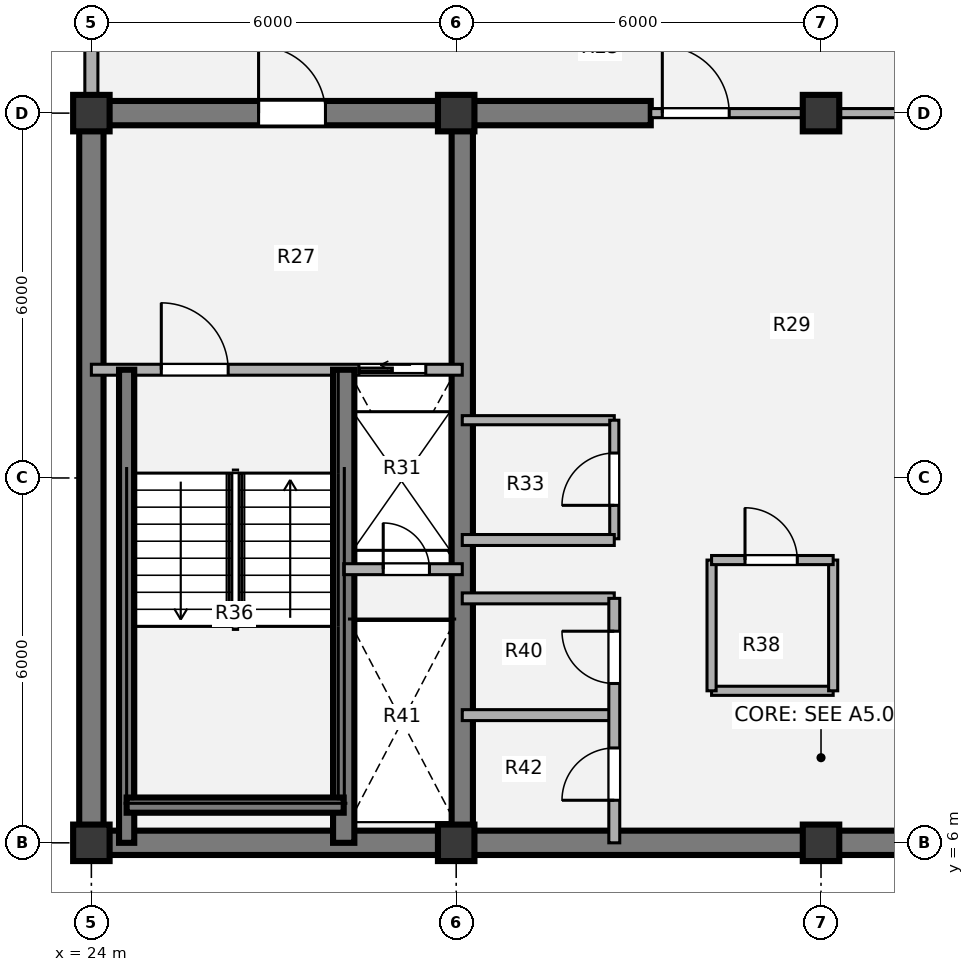
"""IFC4 building model, lengths in metres.
Left out: names, types, materials, properties, quantities, classifications, styles, units other than length and angle.
Written with IfcOpenShell. Run it as: python <this file> out.ifc"""

import sys

from ifc_helpers import new_model, si_unit, direction, frame, frame_2d, origin, origin_2d, place, context, subcontext, project, spatial, rectangle, extrude, source, transform, mapped, element, fill, save


model = new_model("IFC4")
c1 = context("Model", 3, precision=1e-05, world=origin(), true_north=direction((0.0, 1.0)))
c2 = subcontext(c1, "Body", "Model", "MODEL_VIEW")
j1 = project(units=[si_unit("LENGTHUNIT", "METRE"), si_unit("PLANEANGLEUNIT", "RADIAN")], contexts=[c1])
p1 = place(None, origin())
s1 = spatial("IfcSite", under=j1, at=p1, CompositionType="ELEMENT")
p2 = place(p1, origin())
s2 = spatial("IfcBuilding", under=s1, at=p2, CompositionType="ELEMENT")
p3 = place(p2, frame((0.0, 0.0, 264.6)))
s3 = spatial("IfcBuildingStorey", under=s2, at=p3, CompositionType="ELEMENT", Elevation=264.6)
m1 = source(origin(), c2, "Body", "SweptSolid", [
    extrude(rectangle(XDim=0.6, YDim=0.6, at=origin_2d()), origin(), (0.0, 0.0, 1.0), 3.78),
])
for number, where, z_axis, x_axis in (
    (1, (24.0, 6.0, 0.0), (0.0, 0.0, 1.0), (1.0, 0.0, 0.0)),
    (2, (30.0, 6.0, 0.0), (0.0, 0.0, 1.0), (1.0, 0.0, 0.0)),
    (3, (36.0, 6.0, 0.0), (0.0, 0.0, 1.0), (1.0, 0.0, 0.0)),
    (4, (24.0, 18.0, 0.0), (0.0, 0.0, 1.0), (1.0, 0.0, 0.0)),
    (5, (30.0, 18.0, 0.0), (0.0, 0.0, 1.0), (1.0, 0.0, 0.0)),
    (6, (36.0, 18.0, 0.0), (0.0, 0.0, 1.0), (1.0, 0.0, 0.0)),
):
    element("IfcColumn", number, at=place(p3, frame(where, z_axis=z_axis, x_axis=x_axis)), inside=s3, PredefinedType="COLUMN", context=c2, shape_type="MappedRepresentation", body=[
        mapped(m1, transform((0.0, 0.0, 0.0), x_axis=(1.0, 0.0, 0.0), y_axis=(0.0, 1.0, 0.0), z_axis=(0.0, 0.0, 1.0), scale=1.0)),
    ])
p4 = place(p3, frame((48.2, 6.0, 0.0), z_axis=(0.0, 0.0, 1.0), x_axis=(-1.0, 0.0, 0.0)))
e7 = element("IfcWall", 7, at=p4, inside=s3, PredefinedType="SHEAR", context=c2, shape_type="SweptSolid", body=[
    extrude(rectangle(XDim=24.4, YDim=0.4, at=frame_2d((12.2, 0.0))), origin(), (0.0, 0.0, 1.0), 3.78),
])
p5 = place(p3, frame((24.0, 6.0, 0.0), z_axis=(0.0, 0.0, 1.0), x_axis=(0.0, 1.0, 0.0)))
e8 = element("IfcWall", 8, at=p5, inside=s3, PredefinedType="SHEAR", context=c2, shape_type="SweptSolid", body=[
    extrude(rectangle(XDim=12.0, YDim=0.4, at=frame_2d((6.0, 0.0))), origin(), (0.0, 0.0, 1.0), 3.78),
])
p6 = place(p3, frame((23.8, 18.0, 0.0), z_axis=(0.0, 0.0, 1.0), x_axis=(1.0, 0.0, 0.0)))
e9 = element("IfcWall", 9, at=p6, inside=s3, PredefinedType="SHEAR", context=c2, shape_type="SweptSolid", body=[
    extrude(rectangle(XDim=9.4, YDim=0.4, at=frame_2d((4.7, 0.0))), origin(), (0.0, 0.0, 1.0), 3.78),
])
p7 = place(p6, frame((2.95, 0.0, 0.0)))
e10 = element("IfcOpeningElement", 10, at=p7, cuts=e9, PredefinedType="OPENING", context=c2, shape_type="SweptSolid", body=[
    extrude(rectangle(XDim=1.1, YDim=2.1, at=origin_2d()), frame((0.55, 0.21, 1.05), z_axis=(0.0, -1.0, 0.0), x_axis=(1.0, 0.0, 0.0)), (0.0, 0.0, 1.0), 0.42),
])
p8 = place(p3, frame((30.1, 6.0, 0.0), z_axis=(0.0, 0.0, 1.0), x_axis=(0.0, 1.0, 0.0)))
e11 = element("IfcWall", 11, at=p8, inside=s3, PredefinedType="SHEAR", context=c2, shape_type="SweptSolid", body=[
    extrude(rectangle(XDim=12.0, YDim=0.35, at=frame_2d((6.0, 0.0))), origin(), (0.0, 0.0, 1.0), 3.78),
])
p9 = place(p3, frame((24.0, 18.28, 0.0), z_axis=(0.0, 0.0, 1.0), x_axis=(0.0, 1.0, 0.0)))
e12 = element("IfcWall", 12, at=p9, inside=s3, PredefinedType="SOLIDWALL", context=c2, shape_type="SweptSolid", body=[
    extrude(rectangle(XDim=2.77, YDim=0.215, at=frame_2d((1.385, 0.0))), origin(), (0.0, 0.0, 1.0), 2.718),
])
p10 = place(p3, frame((30.1, 12.95, 0.0), z_axis=(0.0, 0.0, 1.0), x_axis=(1.0, 0.0, 0.0)))
e13 = element("IfcWall", 13, at=p10, inside=s3, PredefinedType="PARTITIONING", context=c2, shape_type="SweptSolid", body=[
    extrude(rectangle(XDim=2.5, YDim=0.15, at=frame_2d((1.25, 0.0))), origin(), (0.0, 0.0, 1.0), 3.5),
])
p11 = place(p3, frame((32.6, 11.0, 0.0), z_axis=(0.0, 0.0, 1.0), x_axis=(0.0, 1.0, 0.0)))
e14 = element("IfcWall", 14, at=p11, inside=s3, PredefinedType="PARTITIONING", context=c2, shape_type="SweptSolid", body=[
    extrude(rectangle(XDim=1.95, YDim=0.15, at=frame_2d((0.975, 0.0))), origin(), (0.0, 0.0, 1.0), 3.5),
])
p12 = place(p11, frame((0.55, 0.0, 0.0)))
e15 = element("IfcOpeningElement", 15, at=p12, cuts=e14, PredefinedType="OPENING", context=c2, shape_type="SweptSolid", body=[
    extrude(rectangle(XDim=0.86, YDim=2.1, at=origin_2d()), frame((0.43, 0.085, 1.05), z_axis=(0.0, -1.0, 0.0), x_axis=(1.0, 0.0, 0.0)), (0.0, 0.0, 1.0), 0.17),
])
p13 = place(p3, frame((34.2, 8.5, 0.0), z_axis=(0.0, 0.0, 1.0), x_axis=(1.0, 0.0, 0.0)))
e16 = element("IfcWall", 16, at=p13, inside=s3, PredefinedType="PARTITIONING", context=c2, shape_type="SweptSolid", body=[
    extrude(rectangle(XDim=2.0, YDim=0.15, at=frame_2d((1.0, 0.0))), origin(), (0.0, 0.0, 1.0), 3.5),
])
p14 = place(p3, frame((34.2, 8.5, 0.0), z_axis=(0.0, 0.0, 1.0), x_axis=(0.0, 1.0, 0.0)))
e17 = element("IfcWall", 17, at=p14, inside=s3, PredefinedType="PARTITIONING", context=c2, shape_type="SweptSolid", body=[
    extrude(rectangle(XDim=2.15, YDim=0.15, at=frame_2d((1.075, 0.0))), origin(), (0.0, 0.0, 1.0), 3.5),
])
p15 = place(p3, frame((36.2, 8.5, 0.0), z_axis=(0.0, 0.0, 1.0), x_axis=(0.0, 1.0, 0.0)))
e18 = element("IfcWall", 18, at=p15, inside=s3, PredefinedType="PARTITIONING", context=c2, shape_type="SweptSolid", body=[
    extrude(rectangle(XDim=2.15, YDim=0.15, at=frame_2d((1.075, 0.0))), origin(), (0.0, 0.0, 1.0), 2.715),
])
p16 = place(p3, frame((34.2, 10.65, 0.0), z_axis=(0.0, 0.0, 1.0), x_axis=(1.0, 0.0, 0.0)))
e19 = element("IfcWall", 19, at=p16, inside=s3, PredefinedType="PARTITIONING", context=c2, shape_type="SweptSolid", body=[
    extrude(rectangle(XDim=2.0, YDim=0.15, at=frame_2d((1.0, 0.0))), origin(), (0.0, 0.0, 1.0), 3.5),
])
p17 = place(p16, frame((0.55, 0.0, 0.0)))
e20 = element("IfcOpeningElement", 20, at=p17, cuts=e19, PredefinedType="OPENING", context=c2, shape_type="SweptSolid", body=[
    extrude(rectangle(XDim=0.86, YDim=2.1, at=origin_2d()), frame((0.43, 0.085, 1.05), z_axis=(0.0, -1.0, 0.0), x_axis=(1.0, 0.0, 0.0)), (0.0, 0.0, 1.0), 0.17),
])
for number, where, z_axis, x_axis in (
    (21, (30.1, 10.98, 0.0), (0.0, 0.0, 1.0), (1.0, 0.0, 0.0)),
    (22, (30.1, 8.1, 0.0), (0.0, 0.0, 1.0), (1.0, 0.0, 0.0)),
    (23, (30.1, 10.02, 0.0), (0.0, 0.0, 1.0), (1.0, 0.0, 0.0)),
):
    element("IfcWall", number, at=place(p3, frame(where, z_axis=z_axis, x_axis=x_axis)), inside=s3, PredefinedType="PARTITIONING", context=c2, shape_type="SweptSolid", body=[
        extrude(rectangle(XDim=2.5, YDim=0.18, at=frame_2d((1.25, 0.0))), origin(), (0.0, 0.0, 1.0), 3.5),
    ])
p18 = place(p3, frame((32.6, 6.0, 0.0), z_axis=(0.0, 0.0, 1.0), x_axis=(0.0, 1.0, 0.0)))
e24 = element("IfcWall", 24, at=p18, inside=s3, PredefinedType="PARTITIONING", context=c2, shape_type="SweptSolid", body=[
    extrude(rectangle(XDim=4.02, YDim=0.18, at=frame_2d((2.01, 0.0))), origin(), (0.0, 0.0, 1.0), 3.5),
])
p19 = place(p18, frame((0.7, 0.0, 0.0)))
e25 = element("IfcOpeningElement", 25, at=p19, cuts=e24, PredefinedType="OPENING", context=c2, shape_type="SweptSolid", body=[
    extrude(rectangle(XDim=0.86, YDim=2.1, at=origin_2d()), frame((0.43, 0.1, 1.05), z_axis=(0.0, -1.0, 0.0), x_axis=(1.0, 0.0, 0.0)), (0.0, 0.0, 1.0), 0.2),
])
p20 = place(p18, frame((2.62, 0.0, 0.0)))
e26 = element("IfcOpeningElement", 26, at=p20, cuts=e24, PredefinedType="OPENING", context=c2, shape_type="SweptSolid", body=[
    extrude(rectangle(XDim=0.86, YDim=2.1, at=origin_2d()), frame((0.43, 0.1, 1.05), z_axis=(0.0, -1.0, 0.0), x_axis=(1.0, 0.0, 0.0)), (0.0, 0.0, 1.0), 0.2),
])
p21 = place(p3, frame((33.2, 18.0, 0.0), z_axis=(0.0, 0.0, 1.0), x_axis=(1.0, 0.0, 0.0)))
e27 = element("IfcWall", 27, at=p21, inside=s3, PredefinedType="PARTITIONING", context=c2, shape_type="SweptSolid", body=[
    extrude(rectangle(XDim=5.6, YDim=0.15, at=frame_2d((2.8, 0.0))), origin(), (0.0, 0.0, 1.0), 2.515),
])
p22 = place(p21, frame((0.19, 0.0, 0.0)))
e28 = element("IfcOpeningElement", 28, at=p22, cuts=e27, PredefinedType="OPENING", context=c2, shape_type="SweptSolid", body=[
    extrude(rectangle(XDim=1.1, YDim=2.1, at=origin_2d()), frame((0.55, 0.085, 1.05), z_axis=(0.0, -1.0, 0.0), x_axis=(1.0, 0.0, 0.0)), (0.0, 0.0, 1.0), 0.17),
])
p23 = place(p21, frame((4.31, 0.0, 0.0)))
e29 = element("IfcOpeningElement", 29, at=p23, cuts=e27, PredefinedType="OPENING", context=c2, shape_type="SweptSolid", body=[
    extrude(rectangle(XDim=1.1, YDim=2.1, at=origin_2d()), frame((0.55, 0.085, 1.05), z_axis=(0.0, -1.0, 0.0), x_axis=(1.0, 0.0, 0.0)), (0.0, 0.0, 1.0), 0.17),
])
p24 = place(p3, frame((24.0, 13.78, 0.0), z_axis=(0.0, 0.0, 1.0), x_axis=(1.0, 0.0, 0.0)))
e30 = element("IfcWall", 30, at=p24, inside=s3, PredefinedType="PARTITIONING", context=c2, shape_type="SweptSolid", body=[
    extrude(rectangle(XDim=6.1, YDim=0.18, at=frame_2d((3.05, 0.0))), origin(), (0.0, 0.0, 1.0), 3.5),
])
p25 = place(p24, frame((1.15, 0.0, 0.0)))
e31 = element("IfcOpeningElement", 31, at=p25, cuts=e30, PredefinedType="OPENING", context=c2, shape_type="SweptSolid", body=[
    extrude(rectangle(XDim=1.1, YDim=2.1, at=origin_2d()), frame((0.55, 0.1, 1.05), z_axis=(0.0, -1.0, 0.0), x_axis=(1.0, 0.0, 0.0)), (0.0, 0.0, 1.0), 0.2),
])
p26 = place(p24, frame((4.4, 0.0, 0.0)))
e32 = element("IfcOpeningElement", 32, at=p26, cuts=e30, PredefinedType="OPENING", context=c2, shape_type="SweptSolid", body=[
    extrude(rectangle(XDim=1.1, YDim=2.1, at=origin_2d()), frame((0.55, 0.1, 1.05), z_axis=(0.0, -1.0, 0.0), x_axis=(1.0, 0.0, 0.0)), (0.0, 0.0, 1.0), 0.2),
])
p27 = place(p3, frame((28.15, 6.0, 0.0), z_axis=(0.0, 0.0, 1.0), x_axis=(0.0, 1.0, 0.0)))
e33 = element("IfcWall", 33, at=p27, inside=s3, PredefinedType="SHEAR", context=c2, shape_type="SweptSolid", body=[
    extrude(rectangle(XDim=7.78, YDim=0.35, at=frame_2d((3.89, 0.0))), origin(), (0.0, 0.0, 1.0), 3.85),
])
p28 = place(p3, frame((24.58, 6.0, 0.0), z_axis=(0.0, 0.0, 1.0), x_axis=(0.0, 1.0, 0.0)))
e34 = element("IfcWall", 34, at=p28, inside=s3, PredefinedType="SHEAR", context=c2, shape_type="SweptSolid", body=[
    extrude(rectangle(XDim=7.78, YDim=0.25, at=frame_2d((3.89, 0.0))), origin(), (0.0, 0.0, 1.0), 3.85),
])
p29 = place(p3, frame((24.58, 6.62, 0.0), z_axis=(0.0, 0.0, 1.0), x_axis=(1.0, 0.0, 0.0)))
e35 = element("IfcWall", 35, at=p29, inside=s3, PredefinedType="SHEAR", context=c2, shape_type="SweptSolid", body=[
    extrude(rectangle(XDim=3.57, YDim=0.25, at=frame_2d((1.785, 0.0))), origin(), (0.0, 0.0, 1.0), 3.85),
])
p30 = place(p3, frame((28.15, 10.5, 0.0), z_axis=(0.0, 0.0, 1.0), x_axis=(1.0, 0.0, 0.0)))
e36 = element("IfcWall", 36, at=p30, inside=s3, PredefinedType="PARTITIONING", context=c2, shape_type="SweptSolid", body=[
    extrude(rectangle(XDim=1.95, YDim=0.18, at=frame_2d((0.975, 0.0))), origin(), (0.0, 0.0, 1.0), 3.5),
])
p31 = place(p30, frame((0.65, 0.0, 0.0)))
e37 = element("IfcOpeningElement", 37, at=p31, cuts=e36, PredefinedType="OPENING", context=c2, shape_type="SweptSolid", body=[
    extrude(rectangle(XDim=0.76, YDim=2.05, at=origin_2d()), frame((0.38, 0.1, 1.025), z_axis=(0.0, -1.0, 0.0), x_axis=(1.0, 0.0, 0.0)), (0.0, 0.0, 1.0), 0.2),
])
m2 = source(origin(), c2, "Body", "SweptSolid", [
    extrude(rectangle(XDim=0.86, YDim=2.1, at=origin_2d()), frame((0.43, 0.025, 1.05), z_axis=(0.0, -1.0, 0.0), x_axis=(1.0, 0.0, 0.0)), (0.0, 0.0, 1.0), 0.05),
])
p32 = place(p12, origin())
e38 = element("IfcDoor", 38, at=p32, inside=s3, OperationType="SINGLE_SWING_LEFT", PredefinedType="DOOR", context=c2, shape_type="MappedRepresentation", body=[
    mapped(m2, transform((0.0, 0.0, 0.0), x_axis=(1.0, 0.0, 0.0), y_axis=(0.0, 1.0, 0.0), z_axis=(0.0, 0.0, 1.0), scale=1.0)),
])
fill(e15, e38)
p33 = place(p17, origin())
e39 = element("IfcDoor", 39, at=p33, inside=s3, OperationType="SINGLE_SWING_LEFT", PredefinedType="DOOR", context=c2, shape_type="MappedRepresentation", body=[
    mapped(m2, transform((0.0, 0.0, 0.0), x_axis=(1.0, 0.0, 0.0), y_axis=(0.0, 1.0, 0.0), z_axis=(0.0, 0.0, 1.0), scale=1.0)),
])
fill(e20, e39)
p34 = place(p19, origin())
e40 = element("IfcDoor", 40, at=p34, inside=s3, OperationType="SINGLE_SWING_LEFT", PredefinedType="DOOR", context=c2, shape_type="MappedRepresentation", body=[
    mapped(m2, transform((0.0, 0.0, 0.0), x_axis=(1.0, 0.0, 0.0), y_axis=(0.0, 1.0, 0.0), z_axis=(0.0, 0.0, 1.0), scale=1.0)),
])
fill(e25, e40)
p35 = place(p20, origin())
e41 = element("IfcDoor", 41, at=p35, inside=s3, OperationType="SINGLE_SWING_RIGHT", PredefinedType="DOOR", context=c2, shape_type="MappedRepresentation", body=[
    mapped(m2, transform((0.0, 0.0, 0.0), x_axis=(1.0, 0.0, 0.0), y_axis=(0.0, 1.0, 0.0), z_axis=(0.0, 0.0, 1.0), scale=1.0)),
])
fill(e26, e41)
m3 = source(origin(), c2, "Body", "SweptSolid", [
    extrude(rectangle(XDim=1.1, YDim=2.1, at=origin_2d()), frame((0.55, 0.025, 1.05), z_axis=(0.0, -1.0, 0.0), x_axis=(1.0, 0.0, 0.0)), (0.0, 0.0, 1.0), 0.05),
])
p36 = place(p22, origin())
e42 = element("IfcDoor", 42, at=p36, inside=s3, OperationType="SINGLE_SWING_LEFT", PredefinedType="DOOR", context=c2, shape_type="MappedRepresentation", body=[
    mapped(m3, transform((0.0, 0.0, 0.0), x_axis=(1.0, 0.0, 0.0), y_axis=(0.0, 1.0, 0.0), z_axis=(0.0, 0.0, 1.0), scale=1.0)),
])
fill(e28, e42)
m4 = source(origin(), c2, "Body", "SweptSolid", [
    extrude(rectangle(XDim=1.1, YDim=2.1, at=origin_2d()), frame((0.55, 0.025, 1.05), z_axis=(0.0, -1.0, 0.0), x_axis=(1.0, 0.0, 0.0)), (0.0, 0.0, 1.0), 0.05),
])
p37 = place(p25, origin())
e43 = element("IfcDoor", 43, at=p37, inside=s3, OperationType="SINGLE_SWING_LEFT", PredefinedType="DOOR", context=c2, shape_type="MappedRepresentation", body=[
    mapped(m4, transform((0.0, 0.0, 0.0), x_axis=(1.0, 0.0, 0.0), y_axis=(0.0, 1.0, 0.0), z_axis=(0.0, 0.0, 1.0), scale=1.0)),
])
fill(e31, e43)
m5 = source(origin(), c2, "Body", "SweptSolid", [
    extrude(rectangle(XDim=1.1, YDim=2.1, at=origin_2d()), frame((0.55, 0.025, 1.05), z_axis=(0.0, -1.0, 0.0), x_axis=(1.0, 0.0, 0.0)), (0.0, 0.0, 1.0), 0.05),
])
p38 = place(p26, origin())
e44 = element("IfcDoor", 44, at=p38, inside=s3, OperationType="SLIDING_TO_LEFT", PredefinedType="DOOR", context=c2, shape_type="MappedRepresentation", body=[
    mapped(m5, transform((0.0, 0.0, 0.0), x_axis=(1.0, 0.0, 0.0), y_axis=(0.0, 1.0, 0.0), z_axis=(0.0, 0.0, 1.0), scale=1.0)),
])
fill(e32, e44)
m6 = source(origin(), c2, "Body", "SweptSolid", [
    extrude(rectangle(XDim=0.76, YDim=2.05, at=origin_2d()), frame((0.38, 0.025, 1.025), z_axis=(0.0, -1.0, 0.0), x_axis=(1.0, 0.0, 0.0)), (0.0, 0.0, 1.0), 0.05),
])
p39 = place(p31, origin())
e45 = element("IfcDoor", 45, at=p39, inside=s3, OperationType="SINGLE_SWING_LEFT", PredefinedType="DOOR", context=c2, shape_type="MappedRepresentation", body=[
    mapped(m6, transform((0.0, 0.0, 0.0), x_axis=(1.0, 0.0, 0.0), y_axis=(0.0, 1.0, 0.0), z_axis=(0.0, 0.0, 1.0), scale=1.0)),
])
fill(e37, e45)
p40 = place(p7, origin())
e46 = element("IfcDoor", 46, at=p40, inside=s3, OperationType="SINGLE_SWING_LEFT", PredefinedType="DOOR", context=c2, shape_type="MappedRepresentation", body=[
    mapped(m3, transform((0.0, 0.0, 0.0), x_axis=(1.0, 0.0, 0.0), y_axis=(0.0, 1.0, 0.0), z_axis=(0.0, 0.0, 1.0), scale=1.0)),
])
fill(e10, e46)
save(model, sys.argv[1])
